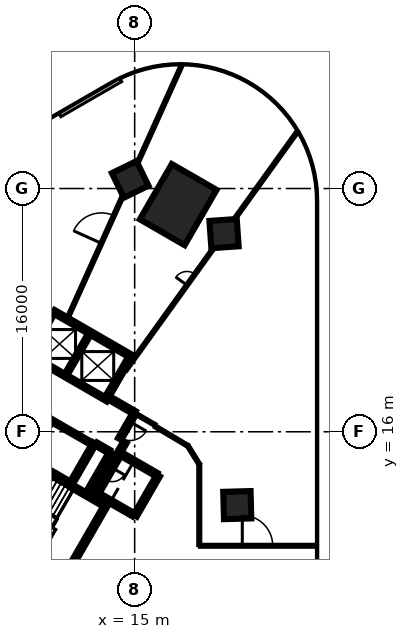
"""IFC4 building model, lengths in metres.
Left out: names, types, materials, properties, quantities, classifications, styles, units other than length and angle.
Written with IfcOpenShell. Run it as: python <this file> out.ifc"""

import sys

from ifc_helpers import new_model, si_unit, direction, frame, frame_2d, origin, origin_2d, place, context, subcontext, project, spatial, polyline, rectangle, outline, extrude, element, fill, save


model = new_model("IFC4")
c1 = context("Model", 3, precision=1e-05, world=origin(), true_north=direction((0.0, 1.0)))
c2 = subcontext(c1, "Body", "Model", "MODEL_VIEW")
j1 = project(units=[si_unit("LENGTHUNIT", "METRE"), si_unit("PLANEANGLEUNIT", "RADIAN")], contexts=[c1])
p1 = place(None, origin())
s1 = spatial("IfcSite", under=j1, at=p1, CompositionType="ELEMENT")
p2 = place(p1, origin())
s2 = spatial("IfcBuilding", under=s1, at=p2, CompositionType="ELEMENT")
p3 = place(p2, origin())
s3 = spatial("IfcBuildingStorey", under=s2, at=p3, CompositionType="ELEMENT", Elevation=0.0)
p4 = place(p3, frame((17.865, 30.942, -0.45), z_axis=(0.0, 0.0, 1.0), x_axis=(0.5, 0.866025403784, 0.0)))
e1 = element("IfcColumn", 1, at=p4, inside=s3, PredefinedType="COLUMN", context=c2, shape_type="SweptSolid", body=[
    extrude(rectangle(XDim=4.2, YDim=3.4, at=origin_2d()), origin(), (0.0, 0.0, 1.0), 7.55),
])
for number, where, z_axis, x_axis in (
    (2, (21.749, 11.174, -0.45), (0.0, 0.0, 1.0), (1.0, 0.027, 0.0)),
    (3, (20.879, 29.034, -0.45), (0.0, 0.0, 1.0), (0.998, 0.07, 0.0)),
    (4, (14.705, 32.599, -0.45), (0.0, 0.0, 1.0), (-0.438, 0.899, 0.0)),
):
    element("IfcColumn", number, at=place(p3, frame(where, z_axis=z_axis, x_axis=x_axis)), inside=s3, PredefinedType="COLUMN", context=c2, shape_type="SweptSolid", body=[
        extrude(rectangle(XDim=1.8, YDim=1.8, at=origin_2d()), origin(), (0.0, 0.0, 1.0), 5.15),
    ])
p5 = place(p3, origin())
e5 = element("IfcWall", 5, at=p5, inside=s3, PredefinedType="SOLIDWALL", context=c2, shape_type="SweptSolid", body=[
    extrude(outline(polyline([(27.0, 31.177), (26.981, 31.766), (26.827, 32.933), (26.522, 34.07), (26.072, 35.157), (25.483, 36.177), (24.767, 37.111), (23.934, 37.943), (23.479, 38.317), (22.5, 38.971), (21.444, 39.492), (20.329, 39.87), (19.175, 40.1), (18.0, 40.177), (16.825, 40.1), (16.244, 40.004), (15.107, 39.699), (14.019, 39.249), (14.115, 39.018), (15.188, 39.462), (16.297, 39.759), (16.854, 39.851), (18.0, 39.926), (19.142, 39.852), (20.265, 39.628), (21.348, 39.26), (22.375, 38.754), (23.33, 38.116), (23.766, 37.758), (24.578, 36.946), (25.275, 36.038), (25.847, 35.047), (26.285, 33.989), (26.581, 32.884), (26.731, 31.745), (26.75, 31.169), (27.0, 31.177)])), origin(), (0.0, 0.0, 1.0), 7.1),
])
p6 = place(p3, frame((10.08, 36.832, 0.0), z_axis=(0.0, 0.0, 1.0), x_axis=(0.866216377649, 0.499669077583, 0.0)))
e6 = element("IfcWall", 6, at=p6, inside=s3, PredefinedType="SOLIDWALL", context=c2, shape_type="SweptSolid", body=[
    extrude(rectangle(XDim=4.62, YDim=0.25, at=frame_2d((2.31, 0.0))), origin(), (0.0, 0.0, 1.0), 7.1),
])
p7 = place(p3, frame((10.42, 6.498, 0.0), z_axis=(0.0, 0.0, 1.0), x_axis=(-0.866021906294, 0.500006057782, 0.0)))
e7 = element("IfcWall", 7, at=p7, inside=s3, PredefinedType="SHEAR", context=c2, shape_type="SweptSolid", body=[
    extrude(rectangle(XDim=11.55, YDim=0.25, at=frame_2d((5.775, 0.0))), origin(), (0.0, 0.0, 1.0), 7.1),
])
p8 = place(p7, frame((10.025, 0.0, 0.0)))
e8 = element("IfcOpeningElement", 8, at=p8, cuts=e7, PredefinedType="OPENING", context=c2, shape_type="SweptSolid", body=[
    extrude(rectangle(XDim=1.2, YDim=2.1, at=frame_2d((0.6, 1.05))), frame((0.0, 0.135, 0.0), z_axis=(0.0, -1.0, 0.0), x_axis=(1.0, 0.0, 0.0)), (0.0, 0.0, 1.0), 0.27),
])
p9 = place(p7, frame((8.725, 0.0, 0.0)))
e9 = element("IfcOpeningElement", 9, at=p9, cuts=e7, PredefinedType="OPENING", context=c2, shape_type="SweptSolid", body=[
    extrude(rectangle(XDim=1.2, YDim=2.1, at=frame_2d((0.6, 1.05))), frame((0.0, 0.135, 0.0), z_axis=(0.0, -1.0, 0.0), x_axis=(1.0, 0.0, 0.0)), (0.0, 0.0, 1.0), 0.27),
])
p10 = place(p3, frame((9.673, 23.903, 0.0), z_axis=(0.0, 0.0, 1.0), x_axis=(0.86603616409, -0.499981362141, 0.0)))
e10 = element("IfcWall", 10, at=p10, inside=s3, PredefinedType="SHEAR", context=c2, shape_type="SweptSolid", body=[
    extrude(rectangle(XDim=5.85, YDim=0.25, at=frame_2d((2.925, 0.0))), origin(), (0.0, 0.0, 1.0), 7.1),
])
p11 = place(p3, frame((13.238, 11.378, 0.0), z_axis=(0.0, 0.0, 1.0), x_axis=(-0.500008851346, -0.866020293397, 0.0)))
e11 = element("IfcWall", 11, at=p11, inside=s3, PredefinedType="SHEAR", context=c2, shape_type="SweptSolid", body=[
    extrude(rectangle(XDim=5.51, YDim=0.25, at=frame_2d((2.755, 0.0))), origin(), (0.0, 0.0, 1.0), 7.1),
])
p12 = place(p3, frame((12.357, 15.252, 0.0), z_axis=(0.0, 0.0, 1.0), x_axis=(-0.500028443584, -0.866008981251, 0.0)))
e12 = element("IfcWall", 12, at=p12, inside=s3, PredefinedType="SHEAR", context=c2, shape_type="SweptSolid", body=[
    extrude(rectangle(XDim=3.2, YDim=0.25, at=frame_2d((1.6, 0.0))), origin(), (0.0, 0.0, 1.0), 7.1),
])
for number, where, z_axis, x_axis in (
    (13, (8.123, 21.219, 0.0), (0.0, 0.0, 1.0), (0.5, 0.866, 0.0)),
    (14, (14.676, 20.87, 0.0), (0.0, 0.0, 1.0), (-0.5, -0.866, 0.0)),
):
    element("IfcWall", number, at=place(p3, frame(where, z_axis=z_axis, x_axis=x_axis)), inside=s3, PredefinedType="SHEAR", context=c2, shape_type="SweptSolid", body=[
        extrude(rectangle(XDim=2.975, YDim=0.25, at=frame_2d((1.487, 0.0))), origin(), (0.0, 0.0, 1.0), 7.1),
    ])
p13 = place(p3, frame((16.552, 13.119, 0.0), z_axis=(0.0, 0.0, 1.0), x_axis=(-0.499978833458, -0.866037623948, 0.0)))
e15 = element("IfcWall", 15, at=p13, inside=s3, PredefinedType="SHEAR", context=c2, shape_type="SweptSolid", body=[
    extrude(rectangle(XDim=3.05, YDim=0.25, at=frame_2d((1.525, 0.0))), origin(), (0.0, 0.0, 1.0), 7.1),
])
p14 = place(p3, frame((14.918, 10.54, 0.0), z_axis=(0.0, 0.0, 1.0), x_axis=(-0.866063538972, 0.499933942099, 0.0)))
e16 = element("IfcWall", 16, at=p14, inside=s3, PredefinedType="SHEAR", context=c2, shape_type="SweptSolid", body=[
    extrude(rectangle(XDim=2.865, YDim=0.25, at=frame_2d((1.432, 0.0))), origin(), (0.0, 0.0, 1.0), 7.1),
])
p15 = place(p3, frame((13.963, 14.614, 0.0), z_axis=(0.0, 0.0, 1.0), x_axis=(0.866042235819, -0.499970844928, 0.0)))
e17 = element("IfcWall", 17, at=p15, inside=s3, PredefinedType="SHEAR", context=c2, shape_type="SweptSolid", body=[
    extrude(rectangle(XDim=2.865, YDim=0.25, at=frame_2d((1.432, 0.0))), origin(), (0.0, 0.0, 1.0), 7.1),
])
p16 = place(p3, frame((11.888, 11.961, 0.0), z_axis=(0.0, 0.0, 1.0), x_axis=(0.500003324108, 0.866023484601, 0.0)))
e18 = element("IfcWall", 18, at=p16, inside=s3, PredefinedType="SHEAR", context=c2, shape_type="SweptSolid", body=[
    extrude(rectangle(XDim=3.085, YDim=0.25, at=frame_2d((1.542, 0.0))), origin(), (0.0, 0.0, 1.0), 7.1),
])
p17 = place(p3, frame((10.865, 12.418, 0.0), z_axis=(0.0, 0.0, 1.0), x_axis=(0.866026229868, -0.499998569178, 0.0)))
e19 = element("IfcWall", 19, at=p17, inside=s3, PredefinedType="SHEAR", context=c2, shape_type="SweptSolid", body=[
    extrude(rectangle(XDim=2.449, YDim=0.25, at=frame_2d((1.225, 0.0))), origin(), (0.0, 0.0, 1.0), 7.1),
])
p18 = place(p3, frame((13.297, 18.231, 0.0), z_axis=(0.0, 0.0, 1.0), x_axis=(0.866043531843, -0.499968599967, 0.0)))
e20 = element("IfcWall", 20, at=p18, inside=s3, PredefinedType="SHEAR", context=c2, shape_type="SweptSolid", body=[
    extrude(rectangle(XDim=1.975, YDim=0.25, at=frame_2d((0.987, 0.0))), origin(), (0.0, 0.0, 1.0), 7.1),
])
p19 = place(p3, frame((14.945, 17.135, 0.0), z_axis=(0.0, 0.0, 1.0), x_axis=(-0.499983108224, -0.866035156036, 0.0)))
e21 = element("IfcWall", 21, at=p19, inside=s3, PredefinedType="SHEAR", context=c2, shape_type="SweptSolid", body=[
    extrude(rectangle(XDim=1.865, YDim=0.25, at=frame_2d((0.932, 0.0))), origin(), (0.0, 0.0, 1.0), 7.1),
])
p20 = place(p19, frame((0.535, 0.0, 0.0)))
e22 = element("IfcOpeningElement", 22, at=p20, cuts=e21, PredefinedType="OPENING", context=c2, shape_type="SweptSolid", body=[
    extrude(rectangle(XDim=1.25, YDim=2.1, at=frame_2d((0.625, 1.05))), frame((0.0, 0.135, 0.0), z_axis=(0.0, -1.0, 0.0), x_axis=(1.0, 0.0, 0.0)), (0.0, 0.0, 1.0), 0.27),
])
p21 = place(p3, frame((13.322, 14.695, 0.0), z_axis=(0.0, 0.0, 1.0), x_axis=(-0.866017078145, 0.500014420154, 0.0)))
e23 = element("IfcWall", 23, at=p21, inside=s3, PredefinedType="SHEAR", context=c2, shape_type="SweptSolid", body=[
    extrude(rectangle(XDim=0.989, YDim=0.25, at=frame_2d((0.495, 0.0))), origin(), (0.0, 0.0, 1.0), 7.1),
])
p22 = place(p3, frame((14.368, 15.315, 0.0), z_axis=(0.0, 0.0, 1.0), x_axis=(-0.499897359611, -0.866084655132, 0.0)))
e24 = element("IfcWall", 24, at=p22, inside=s3, PredefinedType="SHEAR", context=c2, shape_type="SweptSolid", body=[
    extrude(rectangle(XDim=0.685, YDim=0.25, at=frame_2d((0.342, 0.0))), origin(), (0.0, 0.0, 1.0), 7.1),
])
p23 = place(p3, frame((12.433, 11.964, 0.0), z_axis=(0.0, 0.0, 1.0), x_axis=(-0.866055875208, 0.499947218231, 0.0)))
e25 = element("IfcWall", 25, at=p23, inside=s3, PredefinedType="SHEAR", context=c2, shape_type="SweptSolid", body=[
    extrude(rectangle(XDim=0.345, YDim=0.25, at=frame_2d((0.172, 0.0))), origin(), (0.0, 0.0, 1.0), 7.1),
])
p24 = place(p3, frame((13.21, 18.08, 0.0), z_axis=(0.0, 0.0, 1.0), x_axis=(-0.866030299012, 0.499991521122, 0.0)))
e26 = element("IfcWall", 26, at=p24, inside=s3, PredefinedType="SHEAR", context=c2, shape_type="SweptSolid", body=[
    extrude(rectangle(XDim=6.1, YDim=0.2, at=frame_2d((3.05, 0.0))), origin(), (0.0, 0.0, 1.0), 7.1),
])
p25 = place(p24, frame((1.0, 0.0, 0.0)))
e27 = element("IfcOpeningElement", 27, at=p25, cuts=e26, PredefinedType="OPENING", context=c2, shape_type="SweptSolid", body=[
    extrude(rectangle(XDim=1.2, YDim=2.1, at=frame_2d((0.6, 1.05))), frame((0.0, 0.11, 0.0), z_axis=(0.0, -1.0, 0.0), x_axis=(1.0, 0.0, 0.0)), (0.0, 0.0, 1.0), 0.22),
])
p26 = place(p24, frame((4.05, 0.0, 0.0)))
e28 = element("IfcOpeningElement", 28, at=p26, cuts=e26, PredefinedType="OPENING", context=c2, shape_type="SweptSolid", body=[
    extrude(rectangle(XDim=1.2, YDim=2.1, at=frame_2d((0.6, 1.05))), frame((0.0, 0.11, 0.0), z_axis=(0.0, -1.0, 0.0), x_axis=(1.0, 0.0, 0.0)), (0.0, 0.0, 1.0), 0.22),
])
p27 = place(p3, frame((5.775, 15.502, 0.0), z_axis=(0.0, 0.0, 1.0), x_axis=(0.866020080793, -0.500009219579, 0.0)))
e29 = element("IfcWall", 29, at=p27, inside=s3, PredefinedType="SHEAR", context=c2, shape_type="SweptSolid", body=[
    extrude(rectangle(XDim=5.699, YDim=0.2, at=frame_2d((2.85, 0.0))), origin(), (0.0, 0.0, 1.0), 7.1),
])
p28 = place(p3, frame((12.185, 15.207, 0.0), z_axis=(0.0, 0.0, 1.0), x_axis=(-0.866020080793, 0.500009219579, 0.0)))
e30 = element("IfcWall", 30, at=p28, inside=s3, PredefinedType="SHEAR", context=c2, shape_type="SweptSolid", body=[
    extrude(rectangle(XDim=5.699, YDim=0.2, at=frame_2d((2.85, 0.0))), origin(), (0.0, 0.0, 1.0), 7.1),
])
p29 = place(p28, frame((3.874, 0.0, 0.0)))
e31 = element("IfcOpeningElement", 31, at=p29, cuts=e30, PredefinedType="OPENING", context=c2, shape_type="SweptSolid", body=[
    extrude(rectangle(XDim=0.9, YDim=2.1, at=frame_2d((0.45, 1.05))), frame((0.0, 0.11, 0.0), z_axis=(0.0, -1.0, 0.0), x_axis=(1.0, 0.0, 0.0)), (0.0, 0.0, 1.0), 0.22),
])
p30 = place(p3, frame((10.489, 19.767, 0.0), z_axis=(0.0, 0.0, 1.0), x_axis=(0.499946628782, 0.866056215479, 0.0)))
e32 = element("IfcWall", 32, at=p30, inside=s3, PredefinedType="SHEAR", context=c2, shape_type="SweptSolid", body=[
    extrude(rectangle(XDim=3.048, YDim=0.2, at=frame_2d((1.524, 0.0))), origin(), (0.0, 0.0, 1.0), 7.1),
])
p31 = place(p3, frame((14.008, 14.442, 0.0), z_axis=(0.0, 0.0, 1.0), x_axis=(-0.499986818241, -0.866033014143, 0.0)))
e33 = element("IfcWall", 33, at=p31, inside=s3, PredefinedType="SHEAR", context=c2, shape_type="SweptSolid", body=[
    extrude(rectangle(XDim=2.798, YDim=0.2, at=frame_2d((1.399, 0.0))), origin(), (0.0, 0.0, 1.0), 7.1),
])
p32 = place(p31, frame((0.949, 0.0, 0.0)))
e34 = element("IfcOpeningElement", 34, at=p32, cuts=e33, PredefinedType="OPENING", context=c2, shape_type="SweptSolid", body=[
    extrude(rectangle(XDim=0.9, YDim=2.1, at=frame_2d((0.45, 1.05))), frame((0.0, 0.11, 0.0), z_axis=(0.0, -1.0, 0.0), x_axis=(1.0, 0.0, 0.0)), (0.0, 0.0, 1.0), 0.22),
])
p33 = place(p3, frame((8.207, 14.214, 0.0), z_axis=(0.0, 0.0, 1.0), x_axis=(0.499922376475, 0.866070215109, 0.0)))
e35 = element("IfcWall", 35, at=p33, inside=s3, PredefinedType="PARTITIONING", context=c2, shape_type="SweptSolid", body=[
    extrude(rectangle(XDim=2.749, YDim=0.15, at=frame_2d((1.374, 0.0))), origin(), (0.0, 0.0, 1.0), 7.1),
])
p34 = place(p33, frame((0.924, 0.0, 0.0)))
e36 = element("IfcOpeningElement", 36, at=p34, cuts=e35, PredefinedType="OPENING", context=c2, shape_type="SweptSolid", body=[
    extrude(rectangle(XDim=0.9, YDim=2.1, at=frame_2d((0.45, 1.05))), frame((0.0, 0.085, 0.0), z_axis=(0.0, -1.0, 0.0), x_axis=(1.0, 0.0, 0.0)), (0.0, 0.0, 1.0), 0.17),
])
p35 = place(p3, frame((10.63, 23.564, 0.0), z_axis=(0.0, 0.0, 1.0), x_axis=(0.411194888758, 0.911547455407, 0.0)))
e37 = element("IfcWall", 37, at=p35, inside=s3, PredefinedType="PARTITIONING", context=c2, shape_type="SweptSolid", body=[
    extrude(rectangle(XDim=18.215, YDim=0.2, at=frame_2d((9.107, 0.0))), origin(), (0.0, 0.0, 1.0), 4.7),
])
p36 = place(p35, frame((5.3, 0.0, 0.0)))
e38 = element("IfcOpeningElement", 38, at=p36, cuts=e37, PredefinedType="OPENING", context=c2, shape_type="SweptSolid", body=[
    extrude(rectangle(XDim=2.0, YDim=2.1, at=frame_2d((1.0, 1.05))), frame((0.0, 0.11, 0.0), z_axis=(0.0, -1.0, 0.0), x_axis=(1.0, 0.0, 0.0)), (0.0, 0.0, 1.0), 0.22),
])
p37 = place(p3, frame((14.405, 20.029, 0.0), z_axis=(0.0, 0.0, 1.0), x_axis=(0.583802556312, 0.811895667709, 0.0)))
e39 = element("IfcWall", 39, at=p37, inside=s3, PredefinedType="PARTITIONING", context=c2, shape_type="SweptSolid", body=[
    extrude(rectangle(XDim=19.395, YDim=0.2, at=frame_2d((9.697, 0.0))), origin(), (0.0, 0.0, 1.0), 4.7),
])
p38 = place(p37, frame((6.915, 0.0, 0.0)))
e40 = element("IfcOpeningElement", 40, at=p38, cuts=e39, PredefinedType="OPENING", context=c2, shape_type="SweptSolid", body=[
    extrude(rectangle(XDim=0.9, YDim=2.1, at=frame_2d((0.45, 1.05))), frame((0.0, 0.11, 0.0), z_axis=(0.0, -1.0, 0.0), x_axis=(1.0, 0.0, 0.0)), (0.0, 0.0, 1.0), 0.22),
])
p39 = place(p3, frame((15.156, 17.13, 0.0), z_axis=(0.0, 0.0, 1.0), x_axis=(0.865983530368, -0.500072519872, 0.0)))
e41 = element("IfcWall", 41, at=p39, inside=s3, PredefinedType="PARTITIONING", context=c2, shape_type="SweptSolid", body=[
    extrude(rectangle(XDim=1.388, YDim=0.2, at=frame_2d((0.694, 0.0))), origin(), (0.0, 0.0, 1.0), 7.1),
])
p40 = place(p3, frame((16.33, 16.363, 0.0), z_axis=(0.0, 0.0, 1.0), x_axis=(0.859673908033, -0.510843196928, 0.0)))
e42 = element("IfcWall", 42, at=p40, inside=s3, PredefinedType="PARTITIONING", context=c2, shape_type="SweptSolid", body=[
    extrude(rectangle(XDim=2.52, YDim=0.2, at=frame_2d((1.26, 0.0))), origin(), (0.0, 0.0, 1.0), 7.1),
])
p41 = place(p3, frame((18.498, 15.074, 0.0), z_axis=(0.0, 0.0, 1.0), x_axis=(0.527773353517, -0.849385240817, 0.0)))
e43 = element("IfcWall", 43, at=p41, inside=s3, PredefinedType="PARTITIONING", context=c2, shape_type="SweptSolid", body=[
    extrude(rectangle(XDim=1.421, YDim=0.2, at=frame_2d((0.71, 0.0))), origin(), (0.0, 0.0, 1.0), 7.1),
])
p42 = place(p3, frame((19.249, 8.511, 0.0), z_axis=(0.0, 0.0, 1.0), x_axis=(0.0, 1.0, 0.0)))
e44 = element("IfcWall", 44, at=p42, inside=s3, PredefinedType="PARTITIONING", context=c2, shape_type="SweptSolid", body=[
    extrude(rectangle(XDim=5.355, YDim=0.2, at=frame_2d((2.677, 0.0))), origin(), (0.0, 0.0, 1.0), 7.1),
])
p43 = place(p3, frame((19.26, 8.5, 0.0), z_axis=(0.0, 0.0, 1.0), x_axis=(1.0, 0.0, 0.0)))
e45 = element("IfcWall", 45, at=p43, inside=s3, PredefinedType="PARTITIONING", context=c2, shape_type="SweptSolid", body=[
    extrude(rectangle(XDim=7.735, YDim=0.2, at=frame_2d((3.868, 0.0))), origin(), (0.0, 0.0, 1.0), 4.7),
])
p44 = place(p43, frame((2.82, 0.0, 0.0)))
e46 = element("IfcOpeningElement", 46, at=p44, cuts=e45, PredefinedType="OPENING", context=c2, shape_type="SweptSolid", body=[
    extrude(rectangle(XDim=2.0, YDim=2.1, at=frame_2d((1.0, 1.05))), frame((0.0, 0.11, 0.0), z_axis=(0.0, -1.0, 0.0), x_axis=(1.0, 0.0, 0.0)), (0.0, 0.0, 1.0), 0.22),
])
p45 = place(p25, origin())
e47 = element("IfcDoor", 47, at=p45, inside=s3, OperationType="DOUBLE_DOOR_SLIDING", PredefinedType="DOOR", context=c2, shape_type="SweptSolid", body=[
    extrude(rectangle(XDim=1.2, YDim=2.1, at=frame_2d((0.6, 1.05))), frame((0.0, 0.025, 0.0), z_axis=(0.0, -1.0, 0.0), x_axis=(1.0, 0.0, 0.0)), (0.0, 0.0, 1.0), 0.05),
])
fill(e27, e47)
p46 = place(p26, origin())
e48 = element("IfcDoor", 48, at=p46, inside=s3, OperationType="DOUBLE_DOOR_SLIDING", PredefinedType="DOOR", context=c2, shape_type="SweptSolid", body=[
    extrude(rectangle(XDim=1.2, YDim=2.1, at=frame_2d((0.6, 1.05))), frame((0.0, 0.025, 0.0), z_axis=(0.0, -1.0, 0.0), x_axis=(1.0, 0.0, 0.0)), (0.0, 0.0, 1.0), 0.05),
])
fill(e28, e48)
p47 = place(p20, origin())
e49 = element("IfcDoor", 49, at=p47, inside=s3, OperationType="SINGLE_SWING_LEFT", PredefinedType="DOOR", context=c2, shape_type="SweptSolid", body=[
    extrude(rectangle(XDim=1.25, YDim=2.1, at=frame_2d((0.625, 1.05))), frame((0.0, 0.025, 0.0), z_axis=(0.0, -1.0, 0.0), x_axis=(1.0, 0.0, 0.0)), (0.0, 0.0, 1.0), 0.05),
])
fill(e22, e49)
p48 = place(p32, origin())
e50 = element("IfcDoor", 50, at=p48, inside=s3, OperationType="SINGLE_SWING_LEFT", PredefinedType="DOOR", context=c2, shape_type="SweptSolid", body=[
    extrude(rectangle(XDim=0.9, YDim=2.1, at=frame_2d((0.45, 1.05))), frame((0.0, 0.025, 0.0), z_axis=(0.0, -1.0, 0.0), x_axis=(1.0, 0.0, 0.0)), (0.0, 0.0, 1.0), 0.05),
])
fill(e34, e50)
p49 = place(p44, origin())
e51 = element("IfcDoor", 51, at=p49, inside=s3, OperationType="DOUBLE_DOOR_SINGLE_SWING", PredefinedType="DOOR", context=c2, shape_type="SweptSolid", body=[
    extrude(rectangle(XDim=2.0, YDim=2.1, at=frame_2d((1.0, 1.05))), frame((0.0, 0.025, 0.0), z_axis=(0.0, -1.0, 0.0), x_axis=(1.0, 0.0, 0.0)), (0.0, 0.0, 1.0), 0.05),
])
fill(e46, e51)
p50 = place(p38, origin())
e52 = element("IfcDoor", 52, at=p50, inside=s3, OperationType="SINGLE_SWING_LEFT", PredefinedType="DOOR", context=c2, shape_type="SweptSolid", body=[
    extrude(rectangle(XDim=0.9, YDim=2.1, at=frame_2d((0.45, 1.05))), frame((0.0, 0.025, 0.0), z_axis=(0.0, -1.0, 0.0), x_axis=(1.0, 0.0, 0.0)), (0.0, 0.0, 1.0), 0.05),
])
fill(e40, e52)
p51 = place(p36, origin())
e53 = element("IfcDoor", 53, at=p51, inside=s3, OperationType="DOUBLE_DOOR_SINGLE_SWING", PredefinedType="DOOR", context=c2, shape_type="SweptSolid", body=[
    extrude(rectangle(XDim=2.0, YDim=2.1, at=frame_2d((1.0, 1.05))), frame((0.0, 0.025, 0.0), z_axis=(0.0, -1.0, 0.0), x_axis=(1.0, 0.0, 0.0)), (0.0, 0.0, 1.0), 0.05),
])
fill(e38, e53)
save(model, sys.argv[1])
